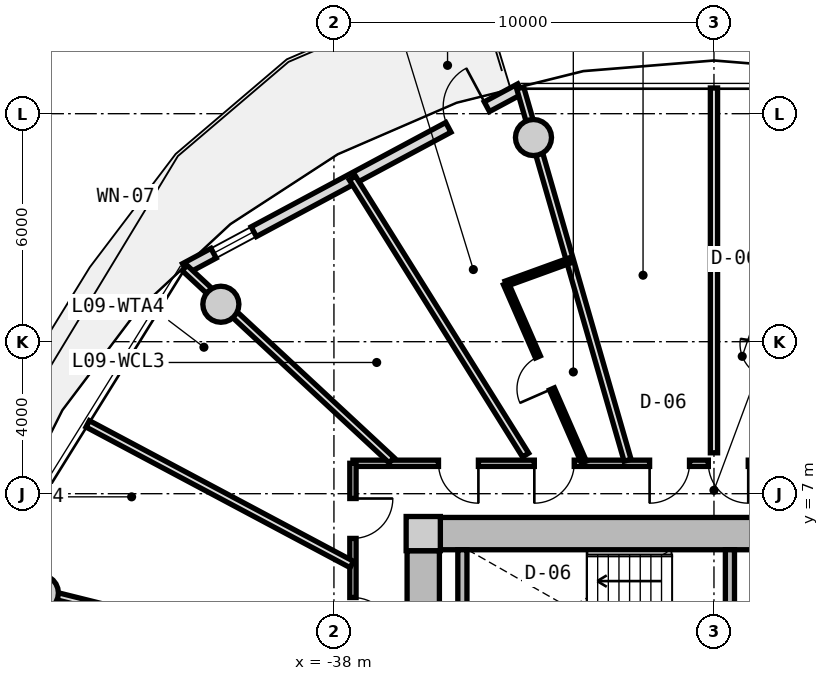
"""IFC4 building model, lengths in metres.
Left out: names, types, materials, properties, quantities, classifications, styles, units other than length and angle.
Written with IfcOpenShell. Run it as: python <this file> out.ifc"""

import sys

from ifc_helpers import new_model, si_unit, direction, frame, frame_2d, origin, origin_2d, place, context, subcontext, project, spatial, rectangle, circle, extrude, source, transform, mapped, element, fill, save


model = new_model("IFC4")
c1 = context("Model", 3, precision=1e-05, world=origin(), true_north=direction((0.0, 1.0)))
c2 = subcontext(c1, "Body", "Model", "MODEL_VIEW")
j1 = project(units=[si_unit("LENGTHUNIT", "METRE"), si_unit("PLANEANGLEUNIT", "RADIAN")], contexts=[c1])
p1 = place(None, origin())
s1 = spatial("IfcSite", under=j1, at=p1, CompositionType="ELEMENT")
p2 = place(p1, origin())
s2 = spatial("IfcBuilding", under=s1, at=p2, CompositionType="ELEMENT")
p3 = place(p2, frame((0.0, 0.0, 33.8)))
s3 = spatial("IfcBuildingStorey", under=s2, at=p3, CompositionType="ELEMENT", Elevation=33.8)
m1 = source(origin(), c2, "Body", "SweptSolid", [
    extrude(rectangle(XDim=0.9, YDim=0.9, at=origin_2d()), origin(), (0.0, 0.0, 1.0), 3.05),
])
p4 = place(p3, frame((-35.65, 5.95, 0.0), z_axis=(0.0, 0.0, 1.0), x_axis=(1.0, 0.0, 0.0)))
e1 = element("IfcColumn", 1, at=p4, inside=s3, PredefinedType="COLUMN", context=c2, shape_type="MappedRepresentation", body=[
    mapped(m1, transform((0.0, 0.0, 0.0), x_axis=(1.0, 0.0, 0.0), y_axis=(0.0, 1.0, 0.0), z_axis=(0.0, 0.0, 1.0), scale=1.0)),
])
m2 = source(origin(), c2, "Body", "SweptSolid", [
    extrude(rectangle(XDim=14.4, YDim=0.85, at=frame_2d((7.2, 0.0))), origin(), (0.0, 0.0, 1.0), 2.79),
])
p5 = place(p3, frame((-35.2, 5.95, 0.0), z_axis=(0.0, 0.0, 1.0), x_axis=(1.0, 0.0, 0.0)))
e2 = element("IfcWall", 2, at=p5, inside=s3, PredefinedType="SHEAR", context=c2, shape_type="MappedRepresentation", body=[
    mapped(m2, transform((0.0, 0.0, 0.0), x_axis=(1.0, 0.0, 0.0), y_axis=(0.0, 1.0, 0.0), z_axis=(0.0, 0.0, 1.0), scale=1.0)),
])
m3 = source(origin(), c2, "Body", "SweptSolid", [
    extrude(rectangle(XDim=11.0, YDim=0.85, at=frame_2d((5.5, 0.0))), origin(), (0.0, 0.0, 1.0), 2.79),
])
p6 = place(p3, frame((-35.65, -5.5, 0.0), z_axis=(0.0, 0.0, 1.0), x_axis=(0.0, 1.0, 0.0)))
e3 = element("IfcWall", 3, at=p6, inside=s3, PredefinedType="SHEAR", context=c2, shape_type="MappedRepresentation", body=[
    mapped(m3, transform((0.0, 0.0, 0.0), x_axis=(1.0, 0.0, 0.0), y_axis=(0.0, 1.0, 0.0), z_axis=(0.0, 0.0, 1.0), scale=1.0)),
])
p7 = place(p6, frame((3.8, 0.0, 0.0)))
e4 = element("IfcOpeningElement", 4, at=p7, cuts=e3, PredefinedType="OPENING", context=c2, shape_type="SweptSolid", body=[
    extrude(rectangle(XDim=1.2, YDim=2.15, at=frame_2d((0.6, 1.075))), frame((0.0, 0.435, 0.0), z_axis=(0.0, -1.0, 0.0), x_axis=(1.0, 0.0, 0.0)), (0.0, 0.0, 1.0), 0.87),
])
m4 = source(origin(), c2, "Body", "SweptSolid", [
    extrude(circle(Radius=0.475, at=origin_2d()), origin(), (0.0, 0.0, 1.0), 3.05),
])
for number, where, z_axis, x_axis in (
    (5, (-32.749, 16.373, 0.0), (0.0, 0.0, 1.0), (1.0, 0.0, 0.0)),
    (6, (-40.975, 11.985, 0.0), (0.0, 0.0, 1.0), (1.0, 0.0, 0.0)),
    (7, (-45.725, 4.387, 0.0), (0.0, 0.0, 1.0), (1.0, 0.0, 0.0)),
):
    element("IfcColumn", number, at=place(p3, frame(where, z_axis=z_axis, x_axis=x_axis)), inside=s3, PredefinedType="COLUMN", context=c2, shape_type="MappedRepresentation", body=[
        mapped(m4, transform((0.0, 0.0, 0.0), x_axis=(1.0, 0.0, 0.0), y_axis=(0.0, 1.0, 0.0), z_axis=(0.0, 0.0, 1.0), scale=1.0)),
    ])
m5 = source(origin(), c2, "Body", "SweptSolid", [
    extrude(rectangle(XDim=10.011, YDim=0.29, at=frame_2d((5.005, 0.0))), origin(), (0.0, 0.0, 1.0), 2.79),
])
p8 = place(p3, frame((-41.916, 12.926, 0.0), z_axis=(0.0, 0.0, 1.0), x_axis=(0.881272505317, 0.472608475773, 0.0)))
e8 = element("IfcWall", 8, at=p8, inside=s3, PredefinedType="SOLIDWALL", context=c2, shape_type="MappedRepresentation", body=[
    mapped(m5, transform((0.0, 0.0, 0.0), x_axis=(1.0, 0.0, 0.0), y_axis=(0.0, 1.0, 0.0), z_axis=(0.0, 0.0, 1.0), scale=1.0)),
])
p9 = place(p8, frame((7.86, 0.0, 0.0)))
e9 = element("IfcOpeningElement", 9, at=p9, cuts=e8, PredefinedType="OPENING", context=c2, shape_type="SweptSolid", body=[
    extrude(rectangle(XDim=1.15, YDim=2.25, at=frame_2d((0.575, 1.125))), frame((0.0, 0.155, 0.0), z_axis=(0.0, -1.0, 0.0), x_axis=(1.0, 0.0, 0.0)), (0.0, 0.0, 1.0), 0.31),
])
p10 = place(p8, frame((0.85, 0.0, 0.85)))
e10 = element("IfcOpeningElement", 10, at=p10, cuts=e8, PredefinedType="OPENING", context=c2, shape_type="SweptSolid", body=[
    extrude(rectangle(XDim=1.2, YDim=1.5, at=frame_2d((0.6, 0.75))), frame((0.0, 0.155, 0.0), z_axis=(0.0, -1.0, 0.0), x_axis=(1.0, 0.0, 0.0)), (0.0, 0.0, 1.0), 0.31),
])
m6 = source(origin(), c2, "Body", "SweptSolid", [
    extrude(rectangle(XDim=3.075, YDim=0.24, at=frame_2d((1.538, 0.0))), origin(), (0.0, 0.0, 1.0), 2.79),
])
p11 = place(p3, frame((-34.62, 2.45, 0.0), z_axis=(0.0, 0.0, 1.0), x_axis=(0.0, 1.0, 0.0)))
e11 = element("IfcWall", 11, at=p11, inside=s3, PredefinedType="PARTITIONING", context=c2, shape_type="MappedRepresentation", body=[
    mapped(m6, transform((0.0, 0.0, 0.0), x_axis=(1.0, 0.0, 0.0), y_axis=(0.0, 1.0, 0.0), z_axis=(0.0, 0.0, 1.0), scale=1.0)),
])
p12 = place(p3, frame((-27.58, 2.45, 0.0), z_axis=(0.0, 0.0, 1.0), x_axis=(0.0, 1.0, 0.0)))
e12 = element("IfcWall", 12, at=p12, inside=s3, PredefinedType="PARTITIONING", context=c2, shape_type="MappedRepresentation", body=[
    mapped(m6, transform((0.0, 0.0, 0.0), x_axis=(1.0, 0.0, 0.0), y_axis=(0.0, 1.0, 0.0), z_axis=(0.0, 0.0, 1.0), scale=1.0)),
])
p13 = place(p12, frame((0.55, 0.0, 0.0)))
e13 = element("IfcOpeningElement", 13, at=p13, cuts=e12, PredefinedType="OPENING", context=c2, shape_type="SweptSolid", body=[
    extrude(rectangle(XDim=1.1, YDim=2.15, at=frame_2d((0.55, 1.075))), frame((0.0, 0.13, 0.0), z_axis=(0.0, -1.0, 0.0), x_axis=(1.0, 0.0, 0.0)), (0.0, 0.0, 1.0), 0.26),
])
m7 = source(origin(), c2, "Body", "SweptSolid", [
    extrude(rectangle(XDim=19.0, YDim=0.165, at=frame_2d((9.5, 0.0))), origin(), (0.0, 0.0, 1.0), 2.775),
])
p14 = place(p3, frame((-37.5, 7.8, 0.0), z_axis=(0.0, 0.0, 1.0), x_axis=(1.0, 0.0, 0.0)))
e14 = element("IfcWall", 14, at=p14, inside=s3, PredefinedType="PARTITIONING", context=c2, shape_type="MappedRepresentation", body=[
    mapped(m7, transform((0.0, 0.0, 0.0), x_axis=(1.0, 0.0, 0.0), y_axis=(0.0, 1.0, 0.0), z_axis=(0.0, 0.0, 1.0), scale=1.0)),
])
p15 = place(p14, frame((9.352, 0.0, 0.0)))
e15 = element("IfcOpeningElement", 15, at=p15, cuts=e14, PredefinedType="OPENING", context=c2, shape_type="SweptSolid", body=[
    extrude(rectangle(XDim=1.05, YDim=2.15, at=frame_2d((0.525, 1.075))), frame((0.0, 0.093, 0.0), z_axis=(0.0, -1.0, 0.0), x_axis=(1.0, 0.0, 0.0)), (0.0, 0.0, 1.0), 0.185),
])
p16 = place(p14, frame((7.806, 0.0, 0.0)))
e16 = element("IfcOpeningElement", 16, at=p16, cuts=e14, PredefinedType="OPENING", context=c2, shape_type="SweptSolid", body=[
    extrude(rectangle(XDim=1.05, YDim=2.15, at=frame_2d((0.525, 1.075))), frame((0.0, 0.093, 0.0), z_axis=(0.0, -1.0, 0.0), x_axis=(1.0, 0.0, 0.0)), (0.0, 0.0, 1.0), 0.185),
])
p17 = place(p14, frame((4.773, 0.0, 0.0)))
e17 = element("IfcOpeningElement", 17, at=p17, cuts=e14, PredefinedType="OPENING", context=c2, shape_type="SweptSolid", body=[
    extrude(rectangle(XDim=1.05, YDim=2.15, at=frame_2d((0.525, 1.075))), frame((0.0, 0.093, 0.0), z_axis=(0.0, -1.0, 0.0), x_axis=(1.0, 0.0, 0.0)), (0.0, 0.0, 1.0), 0.185),
])
p18 = place(p14, frame((2.251, 0.0, 0.0)))
e18 = element("IfcOpeningElement", 18, at=p18, cuts=e14, PredefinedType="OPENING", context=c2, shape_type="SweptSolid", body=[
    extrude(rectangle(XDim=1.05, YDim=2.15, at=frame_2d((0.525, 1.075))), frame((0.0, 0.093, 0.0), z_axis=(0.0, -1.0, 0.0), x_axis=(1.0, 0.0, 0.0)), (0.0, 0.0, 1.0), 0.185),
])
p19 = place(p14, frame((14.653, 0.0, 0.0)))
e19 = element("IfcOpeningElement", 19, at=p19, cuts=e14, PredefinedType="OPENING", context=c2, shape_type="SweptSolid", body=[
    extrude(rectangle(XDim=1.05, YDim=2.15, at=frame_2d((0.525, 1.075))), frame((0.0, 0.093, 0.0), z_axis=(0.0, -1.0, 0.0), x_axis=(1.0, 0.0, 0.0)), (0.0, 0.0, 1.0), 0.185),
])
p20 = place(p14, frame((12.5, 0.0, 0.0)))
e20 = element("IfcOpeningElement", 20, at=p20, cuts=e14, PredefinedType="OPENING", context=c2, shape_type="SweptSolid", body=[
    extrude(rectangle(XDim=1.05, YDim=2.15, at=frame_2d((0.525, 1.075))), frame((0.0, 0.093, 0.0), z_axis=(0.0, -1.0, 0.0), x_axis=(1.0, 0.0, 0.0)), (0.0, 0.0, 1.0), 0.185),
])
m8 = source(origin(), c2, "Body", "SweptSolid", [
    extrude(rectangle(XDim=15.6, YDim=0.165, at=frame_2d((7.8, 0.0))), origin(), (0.0, 0.0, 1.0), 2.775),
])
p21 = place(p3, frame((-37.5, -7.8, 0.0), z_axis=(0.0, 0.0, 1.0), x_axis=(0.0, 1.0, 0.0)))
e21 = element("IfcWall", 21, at=p21, inside=s3, PredefinedType="PARTITIONING", context=c2, shape_type="MappedRepresentation", body=[
    mapped(m8, transform((0.0, 0.0, 0.0), x_axis=(1.0, 0.0, 0.0), y_axis=(0.0, 1.0, 0.0), z_axis=(0.0, 0.0, 1.0), scale=1.0)),
])
p22 = place(p21, frame((13.623, 0.0, 0.0)))
e22 = element("IfcOpeningElement", 22, at=p22, cuts=e21, PredefinedType="OPENING", context=c2, shape_type="SweptSolid", body=[
    extrude(rectangle(XDim=1.05, YDim=2.15, at=frame_2d((0.525, 1.075))), frame((0.0, 0.093, 0.0), z_axis=(0.0, -1.0, 0.0), x_axis=(1.0, 0.0, 0.0)), (0.0, 0.0, 1.0), 0.185),
])
p23 = place(p21, frame((11.018, 0.0, 0.0)))
e23 = element("IfcOpeningElement", 23, at=p23, cuts=e21, PredefinedType="OPENING", context=c2, shape_type="SweptSolid", body=[
    extrude(rectangle(XDim=1.05, YDim=2.15, at=frame_2d((0.525, 1.075))), frame((0.0, 0.093, 0.0), z_axis=(0.0, -1.0, 0.0), x_axis=(1.0, 0.0, 0.0)), (0.0, 0.0, 1.0), 0.185),
])
p24 = place(p21, frame((8.467, 0.0, 0.0)))
e24 = element("IfcOpeningElement", 24, at=p24, cuts=e21, PredefinedType="OPENING", context=c2, shape_type="SweptSolid", body=[
    extrude(rectangle(XDim=1.05, YDim=2.15, at=frame_2d((0.525, 1.075))), frame((0.0, 0.093, 0.0), z_axis=(0.0, -1.0, 0.0), x_axis=(1.0, 0.0, 0.0)), (0.0, 0.0, 1.0), 0.185),
])
p25 = place(p21, frame((6.035, 0.0, 0.0)))
e25 = element("IfcOpeningElement", 25, at=p25, cuts=e21, PredefinedType="OPENING", context=c2, shape_type="SweptSolid", body=[
    extrude(rectangle(XDim=1.05, YDim=2.15, at=frame_2d((0.525, 1.075))), frame((0.0, 0.093, 0.0), z_axis=(0.0, -1.0, 0.0), x_axis=(1.0, 0.0, 0.0)), (0.0, 0.0, 1.0), 0.185),
])
p26 = place(p21, frame((4.034, 0.0, 0.0)))
e26 = element("IfcOpeningElement", 26, at=p26, cuts=e21, PredefinedType="OPENING", context=c2, shape_type="SweptSolid", body=[
    extrude(rectangle(XDim=0.92, YDim=2.1, at=frame_2d((0.46, 1.05))), frame((0.0, 0.093, 0.0), z_axis=(0.0, -1.0, 0.0), x_axis=(1.0, 0.0, 0.0)), (0.0, 0.0, 1.0), 0.185),
])
p27 = place(p21, frame((1.426, 0.0, 0.0)))
e27 = element("IfcOpeningElement", 27, at=p27, cuts=e21, PredefinedType="OPENING", context=c2, shape_type="SweptSolid", body=[
    extrude(rectangle(XDim=0.92, YDim=2.1, at=frame_2d((0.46, 1.05))), frame((0.0, 0.093, 0.0), z_axis=(0.0, -1.0, 0.0), x_axis=(1.0, 0.0, 0.0)), (0.0, 0.0, 1.0), 0.185),
])
m9 = source(origin(), c2, "Body", "SweptSolid", [
    extrude(rectangle(XDim=10.196, YDim=0.19, at=frame_2d((5.098, 0.0))), origin(), (0.0, 0.0, 1.0), 2.225),
])
p28 = place(p3, frame((-30.273, 7.88, 0.0), z_axis=(0.0, 0.0, 1.0), x_axis=(-0.277136420347, 0.960830580549, 0.0)))
e28 = element("IfcWall", 28, at=p28, inside=s3, PredefinedType="PARTITIONING", context=c2, shape_type="MappedRepresentation", body=[
    mapped(m9, transform((0.0, 0.0, 0.0), x_axis=(1.0, 0.0, 0.0), y_axis=(0.0, 1.0, 0.0), z_axis=(0.0, 0.0, 1.0), scale=1.0)),
])
m10 = source(origin(), c2, "Body", "SweptSolid", [
    extrude(rectangle(XDim=9.601, YDim=0.19, at=frame_2d((4.8, 0.0))), origin(), (0.0, 0.0, 1.0), 2.775),
])
p29 = place(p3, frame((-28.0, 8.076, 0.0), z_axis=(0.0, 0.0, 1.0), x_axis=(0.0, 1.0, 0.0)))
e29 = element("IfcWall", 29, at=p29, inside=s3, PredefinedType="PARTITIONING", context=c2, shape_type="MappedRepresentation", body=[
    mapped(m10, transform((0.0, 0.0, 0.0), x_axis=(1.0, 0.0, 0.0), y_axis=(0.0, 1.0, 0.0), z_axis=(0.0, 0.0, 1.0), scale=1.0)),
])
m11 = source(origin(), c2, "Body", "SweptSolid", [
    extrude(rectangle(XDim=7.435, YDim=0.19, at=frame_2d((3.717, 0.0))), origin(), (0.0, 0.0, 1.0), 2.225),
])
p30 = place(p3, frame((-36.483, 7.88, 0.0), z_axis=(0.0, 0.0, 1.0), x_axis=(-0.732651956848, 0.680603489652, 0.0)))
e30 = element("IfcWall", 30, at=p30, inside=s3, PredefinedType="PARTITIONING", context=c2, shape_type="MappedRepresentation", body=[
    mapped(m11, transform((0.0, 0.0, 0.0), x_axis=(1.0, 0.0, 0.0), y_axis=(0.0, 1.0, 0.0), z_axis=(0.0, 0.0, 1.0), scale=1.0)),
])
m12 = source(origin(), c2, "Body", "SweptSolid", [
    extrude(rectangle(XDim=8.598, YDim=0.19, at=frame_2d((4.299, 0.0))), origin(), (0.0, 0.0, 1.0), 2.775),
])
p31 = place(p3, frame((-32.957, 8.017, 0.0), z_axis=(0.0, 0.0, 1.0), x_axis=(-0.530039776395, 0.847972779893, 0.0)))
e31 = element("IfcWall", 31, at=p31, inside=s3, PredefinedType="PARTITIONING", context=c2, shape_type="MappedRepresentation", body=[
    mapped(m12, transform((0.0, 0.0, 0.0), x_axis=(1.0, 0.0, 0.0), y_axis=(0.0, 1.0, 0.0), z_axis=(0.0, 0.0, 1.0), scale=1.0)),
])
m13 = source(origin(), c2, "Body", "SweptSolid", [
    extrude(rectangle(XDim=5.126, YDim=0.14, at=frame_2d((2.563, 0.0))), origin(), (0.0, 0.0, 1.0), 2.775),
])
p32 = place(p3, frame((-31.422, 7.83, 0.0), z_axis=(0.0, 0.0, 1.0), x_axis=(-0.400473994842, 0.916308124735, 0.0)))
e32 = element("IfcWall", 32, at=p32, inside=s3, PredefinedType="PARTITIONING", context=c2, shape_type="MappedRepresentation", body=[
    mapped(m13, transform((0.0, 0.0, 0.0), x_axis=(1.0, 0.0, 0.0), y_axis=(0.0, 1.0, 0.0), z_axis=(0.0, 0.0, 1.0), scale=1.0)),
])
p33 = place(p32, frame((2.103, 0.0, 0.0)))
e33 = element("IfcOpeningElement", 33, at=p33, cuts=e32, PredefinedType="OPENING", context=c2, shape_type="SweptSolid", body=[
    extrude(rectangle(XDim=0.92, YDim=2.1, at=frame_2d((0.46, 1.05))), frame((0.0, 0.08, 0.0), z_axis=(0.0, -1.0, 0.0), x_axis=(1.0, 0.0, 0.0)), (0.0, 0.0, 1.0), 0.16),
])
m14 = source(origin(), c2, "Body", "SweptSolid", [
    extrude(rectangle(XDim=1.811, YDim=0.14, at=frame_2d((0.906, 0.0))), origin(), (0.0, 0.0, 1.0), 2.775),
])
p34 = place(p3, frame((-33.475, 12.527, 0.0), z_axis=(0.0, 0.0, 1.0), x_axis=(0.940009682452, 0.341147764021, 0.0)))
e34 = element("IfcWall", 34, at=p34, inside=s3, PredefinedType="PARTITIONING", context=c2, shape_type="MappedRepresentation", body=[
    mapped(m14, transform((0.0, 0.0, 0.0), x_axis=(1.0, 0.0, 0.0), y_axis=(0.0, 1.0, 0.0), z_axis=(0.0, 0.0, 1.0), scale=1.0)),
])
m15 = source(origin(), c2, "Body", "SweptSolid", [
    extrude(rectangle(XDim=9.737, YDim=0.19, at=frame_2d((4.869, 0.0))), origin(), (0.0, 0.0, 1.0), 2.225),
])
p35 = place(p3, frame((-37.58, 2.385, 0.0), z_axis=(0.0, 0.0, 1.0), x_axis=(-0.970392716238, 0.241532557375, 0.0)))
e35 = element("IfcWall", 35, at=p35, inside=s3, PredefinedType="PARTITIONING", context=c2, shape_type="MappedRepresentation", body=[
    mapped(m15, transform((0.0, 0.0, 0.0), x_axis=(1.0, 0.0, 0.0), y_axis=(0.0, 1.0, 0.0), z_axis=(0.0, 0.0, 1.0), scale=1.0)),
])
m16 = source(origin(), c2, "Body", "SweptSolid", [
    extrude(rectangle(XDim=7.873, YDim=0.19, at=frame_2d((3.937, 0.0))), origin(), (0.0, 0.0, 1.0), 2.775),
])
p36 = place(p3, frame((-37.53, 5.138, 0.0), z_axis=(0.0, 0.0, 1.0), x_axis=(-0.882666052726, 0.470000680175, 0.0)))
e36 = element("IfcWall", 36, at=p36, inside=s3, PredefinedType="PARTITIONING", context=c2, shape_type="MappedRepresentation", body=[
    mapped(m16, transform((0.0, 0.0, 0.0), x_axis=(1.0, 0.0, 0.0), y_axis=(0.0, 1.0, 0.0), z_axis=(0.0, 0.0, 1.0), scale=1.0)),
])
m17 = source(origin(), c2, "Body", "SweptSolid", [
    extrude(rectangle(XDim=1.15, YDim=2.25, at=frame_2d((0.575, 1.125))), frame((0.0, 0.025, 0.0), z_axis=(0.0, -1.0, 0.0), x_axis=(1.0, 0.0, 0.0)), (0.0, 0.0, 1.0), 0.05),
])
p37 = place(p9, origin())
e37 = element("IfcDoor", 37, at=p37, inside=s3, OperationType="SINGLE_SWING_RIGHT", PredefinedType="DOOR", context=c2, shape_type="MappedRepresentation", body=[
    mapped(m17, transform((0.0, 0.0, 0.0), x_axis=(1.0, 0.0, 0.0), y_axis=(0.0, 1.0, 0.0), z_axis=(0.0, 0.0, 1.0), scale=1.0)),
])
fill(e9, e37)
m18 = source(origin(), c2, "Body", "SweptSolid", [
    extrude(rectangle(XDim=1.2, YDim=1.5, at=frame_2d((0.6, 0.75))), frame((0.0, 0.03, 0.0), z_axis=(0.0, -1.0, 0.0), x_axis=(1.0, 0.0, 0.0)), (0.0, 0.0, 1.0), 0.06),
])
p38 = place(p10, origin())
e38 = element("IfcWindow", 38, at=p38, inside=s3, PartitioningType="SINGLE_PANEL", PredefinedType="WINDOW", context=c2, shape_type="MappedRepresentation", body=[
    mapped(m18, transform((0.0, 0.0, 0.0), x_axis=(1.0, 0.0, 0.0), y_axis=(0.0, 1.0, 0.0), z_axis=(0.0, 0.0, 1.0), scale=1.0)),
])
fill(e10, e38)
m19 = source(origin(), c2, "Body", "SweptSolid", [
    extrude(rectangle(XDim=1.05, YDim=2.15, at=frame_2d((0.525, 1.075))), frame((0.0, 0.025, 0.0), z_axis=(0.0, -1.0, 0.0), x_axis=(1.0, 0.0, 0.0)), (0.0, 0.0, 1.0), 0.05),
])
p39 = place(p15, frame((1.05, 0.0, 0.0), z_axis=(0.0, 0.0, 1.0), x_axis=(-1.0, 0.0, 0.0)))
e39 = element("IfcDoor", 39, at=p39, inside=s3, OperationType="SINGLE_SWING_LEFT", PredefinedType="DOOR", context=c2, shape_type="MappedRepresentation", body=[
    mapped(m19, transform((0.0, 0.0, 0.0), x_axis=(1.0, 0.0, 0.0), y_axis=(0.0, 1.0, 0.0), z_axis=(0.0, 0.0, 1.0), scale=1.0)),
])
fill(e15, e39)
p40 = place(p16, frame((1.05, 0.0, 0.0), z_axis=(0.0, 0.0, 1.0), x_axis=(-1.0, 0.0, 0.0)))
e40 = element("IfcDoor", 40, at=p40, inside=s3, OperationType="SINGLE_SWING_RIGHT", PredefinedType="DOOR", context=c2, shape_type="MappedRepresentation", body=[
    mapped(m19, transform((0.0, 0.0, 0.0), x_axis=(1.0, 0.0, 0.0), y_axis=(0.0, 1.0, 0.0), z_axis=(0.0, 0.0, 1.0), scale=1.0)),
])
fill(e16, e40)
p41 = place(p17, frame((1.05, 0.0, 0.0), z_axis=(0.0, 0.0, 1.0), x_axis=(-1.0, 0.0, 0.0)))
e41 = element("IfcDoor", 41, at=p41, inside=s3, OperationType="SINGLE_SWING_RIGHT", PredefinedType="DOOR", context=c2, shape_type="MappedRepresentation", body=[
    mapped(m19, transform((0.0, 0.0, 0.0), x_axis=(1.0, 0.0, 0.0), y_axis=(0.0, 1.0, 0.0), z_axis=(0.0, 0.0, 1.0), scale=1.0)),
])
fill(e17, e41)
m20 = source(origin(), c2, "Body", "SweptSolid", [
    extrude(rectangle(XDim=0.92, YDim=2.1, at=frame_2d((0.46, 1.05))), frame((0.0, 0.025, 0.0), z_axis=(0.0, -1.0, 0.0), x_axis=(1.0, 0.0, 0.0)), (0.0, 0.0, 1.0), 0.05),
])
p42 = place(p33, origin())
e42 = element("IfcDoor", 42, at=p42, inside=s3, OperationType="SINGLE_SWING_LEFT", PredefinedType="DOOR", context=c2, shape_type="MappedRepresentation", body=[
    mapped(m20, transform((0.0, 0.0, 0.0), x_axis=(1.0, 0.0, 0.0), y_axis=(0.0, 1.0, 0.0), z_axis=(0.0, 0.0, 1.0), scale=1.0)),
])
fill(e33, e42)
p43 = place(p18, frame((1.05, 0.0, 0.0), z_axis=(0.0, 0.0, 1.0), x_axis=(-1.0, 0.0, 0.0)))
e43 = element("IfcDoor", 43, at=p43, inside=s3, OperationType="SINGLE_SWING_LEFT", PredefinedType="DOOR", context=c2, shape_type="MappedRepresentation", body=[
    mapped(m19, transform((0.0, 0.0, 0.0), x_axis=(1.0, 0.0, 0.0), y_axis=(0.0, 1.0, 0.0), z_axis=(0.0, 0.0, 1.0), scale=1.0)),
])
fill(e18, e43)
p44 = place(p22, frame((1.05, 0.0, 0.0), z_axis=(0.0, 0.0, 1.0), x_axis=(-1.0, 0.0, 0.0)))
e44 = element("IfcDoor", 44, at=p44, inside=s3, OperationType="SINGLE_SWING_LEFT", PredefinedType="DOOR", context=c2, shape_type="MappedRepresentation", body=[
    mapped(m19, transform((0.0, 0.0, 0.0), x_axis=(1.0, 0.0, 0.0), y_axis=(0.0, 1.0, 0.0), z_axis=(0.0, 0.0, 1.0), scale=1.0)),
])
fill(e22, e44)
p45 = place(p23, frame((1.05, 0.0, 0.0), z_axis=(0.0, 0.0, 1.0), x_axis=(-1.0, 0.0, 0.0)))
e45 = element("IfcDoor", 45, at=p45, inside=s3, OperationType="SINGLE_SWING_RIGHT", PredefinedType="DOOR", context=c2, shape_type="MappedRepresentation", body=[
    mapped(m19, transform((0.0, 0.0, 0.0), x_axis=(1.0, 0.0, 0.0), y_axis=(0.0, 1.0, 0.0), z_axis=(0.0, 0.0, 1.0), scale=1.0)),
])
fill(e23, e45)
save(model, sys.argv[1])
